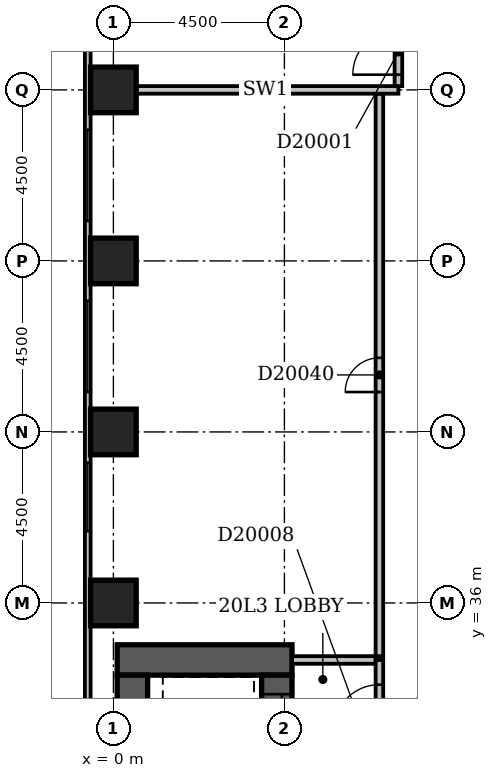
"""IFC4 building model, lengths in metres.
Left out: names, types, materials, properties, quantities, classifications, styles, units other than length and angle.
Written with IfcOpenShell. Run it as: python <this file> out.ifc"""

import sys

from ifc_helpers import new_model, si_unit, direction, frame, frame_2d, origin, origin_2d, place, context, subcontext, project, spatial, rectangle, extrude, element, fill, save


model = new_model("IFC4")
c1 = context("Model", 3, precision=1e-05, world=origin(), true_north=direction((0.0, 1.0)))
c2 = subcontext(c1, "Body", "Model", "MODEL_VIEW")
j1 = project(units=[si_unit("LENGTHUNIT", "METRE"), si_unit("PLANEANGLEUNIT", "RADIAN")], contexts=[c1])
p1 = place(None, origin())
s1 = spatial("IfcSite", under=j1, at=p1, CompositionType="ELEMENT")
p2 = place(p1, origin())
s2 = spatial("IfcBuilding", under=s1, at=p2, CompositionType="ELEMENT")
p3 = place(p2, frame((0.0, 0.0, 83.0)))
s3 = spatial("IfcBuildingStorey", under=s2, at=p3, CompositionType="ELEMENT", Elevation=83.0)
p4 = place(p3, frame((0.1, 34.5, -0.3), z_axis=(0.0, 0.0, 1.0), x_axis=(1.0, 0.0, 0.0)))
e1 = element("IfcWall", 1, at=p4, inside=s3, PredefinedType="SHEAR", context=c2, shape_type="SweptSolid", body=[
    extrude(rectangle(XDim=4.6, YDim=0.8, at=frame_2d((2.3, 0.0))), origin(), (0.0, 0.0, 1.0), 3.6),
])
p5 = place(p3, frame((0.5, 27.15, -0.3), z_axis=(0.0, 0.0, 1.0), x_axis=(0.0, 1.0, 0.0)))
e2 = element("IfcWall", 2, at=p5, inside=s3, PredefinedType="SHEAR", context=c2, shape_type="SweptSolid", body=[
    extrude(rectangle(XDim=6.95, YDim=0.8, at=frame_2d((3.475, 0.0))), origin(), (0.0, 0.0, 1.0), 3.6),
])
p6 = place(p3, frame((4.3, 27.15, -0.3), z_axis=(0.0, 0.0, 1.0), x_axis=(0.0, 1.0, 0.0)))
e3 = element("IfcWall", 3, at=p6, inside=s3, PredefinedType="SHEAR", context=c2, shape_type="SweptSolid", body=[
    extrude(rectangle(XDim=6.95, YDim=0.8, at=frame_2d((3.475, 0.0))), origin(), (0.0, 0.0, 1.0), 3.6),
])
p7 = place(p6, frame((3.05, 0.0, 0.3)))
e4 = element("IfcOpeningElement", 4, at=p7, cuts=e3, PredefinedType="OPENING", context=c2, shape_type="SweptSolid", body=[
    extrude(rectangle(XDim=1.1, YDim=2.1, at=frame_2d((0.55, 1.05))), frame((0.0, 0.412, 0.0), z_axis=(0.0, -1.0, 0.0), x_axis=(1.0, 0.0, 0.0)), (0.0, 0.0, 1.0), 0.824),
])
p8 = place(p6, frame((0.55, 0.0, 0.3)))
e5 = element("IfcOpeningElement", 5, at=p8, cuts=e3, PredefinedType="OPENING", context=c2, shape_type="SweptSolid", body=[
    extrude(rectangle(XDim=1.1, YDim=2.1, at=frame_2d((0.55, 1.05))), frame((0.0, 0.412, 0.0), z_axis=(0.0, -1.0, 0.0), x_axis=(1.0, 0.0, 0.0)), (0.0, 0.0, 1.0), 0.824),
])
p9 = place(p6, frame((5.35, 0.0, 0.3)))
e6 = element("IfcOpeningElement", 6, at=p9, cuts=e3, PredefinedType="OPENING", context=c2, shape_type="SweptSolid", body=[
    extrude(rectangle(XDim=1.1, YDim=2.1, at=frame_2d((0.55, 1.05))), frame((0.0, 0.412, 0.0), z_axis=(0.0, -1.0, 0.0), x_axis=(1.0, 0.0, 0.0)), (0.0, 0.0, 1.0), 0.824),
])
for number, where, z_axis, x_axis in (
    (7, (0.0, 36.0, -0.3), (0.0, 0.0, 1.0), (1.0, 0.0, 0.0)),
    (8, (0.0, 40.5, -0.3), (0.0, 0.0, 1.0), (1.0, 0.0, 0.0)),
    (9, (0.0, 45.0, -0.3), (0.0, 0.0, 1.0), (1.0, 0.0, 0.0)),
    (10, (0.0, 49.5, -0.3), (0.0, 0.0, 1.0), (1.0, 0.0, 0.0)),
):
    element("IfcColumn", number, at=place(p3, frame(where, z_axis=z_axis, x_axis=x_axis)), inside=s3, PredefinedType="COLUMN", context=c2, shape_type="SweptSolid", body=[
        extrude(rectangle(XDim=1.2, YDim=1.2, at=origin_2d()), origin(), (0.0, 0.0, 1.0), 3.6),
    ])
p10 = place(p3, frame((-0.675, 59.1, 0.0), z_axis=(0.0, 0.0, 1.0), x_axis=(0.0, -1.0, 0.0)))
e11 = element("IfcWall", 11, at=p10, inside=s3, PredefinedType="STANDARD", context=c2, shape_type="SweptSolid", body=[
    extrude(rectangle(XDim=55.35, YDim=0.15, at=frame_2d((27.675, 0.0))), origin(), (0.0, 0.0, 1.0), 2.7),
])
p11 = place(p10, frame((10.65, 0.0, 0.6)))
e12 = element("IfcOpeningElement", 12, at=p11, cuts=e11, PredefinedType="OPENING", context=c2, shape_type="SweptSolid", body=[
    extrude(rectangle(XDim=2.4, YDim=1.8, at=frame_2d((1.2, 0.9))), frame((0.0, 0.087, 0.0), z_axis=(0.0, -1.0, 0.0), x_axis=(1.0, 0.0, 0.0)), (0.0, 0.0, 1.0), 0.174),
])
p12 = place(p10, frame((15.15, 0.0, 0.6)))
e13 = element("IfcOpeningElement", 13, at=p12, cuts=e11, PredefinedType="OPENING", context=c2, shape_type="SweptSolid", body=[
    extrude(rectangle(XDim=2.4, YDim=1.8, at=frame_2d((1.2, 0.9))), frame((0.0, 0.087, 0.0), z_axis=(0.0, -1.0, 0.0), x_axis=(1.0, 0.0, 0.0)), (0.0, 0.0, 1.0), 0.174),
])
p13 = place(p10, frame((19.41, 0.0, 0.6)))
e14 = element("IfcOpeningElement", 14, at=p13, cuts=e11, PredefinedType="OPENING", context=c2, shape_type="SweptSolid", body=[
    extrude(rectangle(XDim=1.8, YDim=1.8, at=frame_2d((0.9, 0.9))), frame((0.0, 0.087, 0.0), z_axis=(0.0, -1.0, 0.0), x_axis=(1.0, 0.0, 0.0)), (0.0, 0.0, 1.0), 0.174),
])
p14 = place(p3, frame((7.0, 32.1, 0.0), z_axis=(0.0, 0.0, 1.0), x_axis=(0.0, 1.0, 0.0)))
e15 = element("IfcWall", 15, at=p14, inside=s3, PredefinedType="PARTITIONING", context=c2, shape_type="SweptSolid", body=[
    extrude(rectangle(XDim=2.4, YDim=0.2, at=frame_2d((1.2, 0.0))), origin(), (0.0, 0.0, 1.0), 3.3),
])
p15 = place(p14, frame((0.55, 0.0, 0.0)))
e16 = element("IfcOpeningElement", 16, at=p15, cuts=e15, PredefinedType="OPENING", context=c2, shape_type="SweptSolid", body=[
    extrude(rectangle(XDim=1.2, YDim=2.1, at=frame_2d((0.6, 1.05))), frame((0.0, 0.112, 0.0), z_axis=(0.0, -1.0, 0.0), x_axis=(1.0, 0.0, 0.0)), (0.0, 0.0, 1.0), 0.224),
])
p16 = place(p3, frame((4.7, 34.5, 0.0), z_axis=(0.0, 0.0, 1.0), x_axis=(1.0, 0.0, 0.0)))
e17 = element("IfcWall", 17, at=p16, inside=s3, PredefinedType="PARTITIONING", context=c2, shape_type="SweptSolid", body=[
    extrude(rectangle(XDim=2.2, YDim=0.2, at=frame_2d((1.1, 0.0))), origin(), (0.0, 0.0, 1.0), 3.3),
])
p17 = place(p3, frame((0.5, 49.5, 0.0), z_axis=(0.0, 0.0, 1.0), x_axis=(1.0, 0.0, 0.0)))
e18 = element("IfcWall", 18, at=p17, inside=s3, PredefinedType="PARTITIONING", context=c2, shape_type="SweptSolid", body=[
    extrude(rectangle(XDim=7.0, YDim=0.2, at=frame_2d((3.5, 0.0))), origin(), (0.0, 0.0, 1.0), 3.3),
])
p18 = place(p3, frame((7.5, 49.6, 0.0), z_axis=(0.0, 0.0, 1.0), x_axis=(0.0, 1.0, 0.0)))
e19 = element("IfcWall", 19, at=p18, inside=s3, PredefinedType="PARTITIONING", context=c2, shape_type="SweptSolid", body=[
    extrude(rectangle(XDim=3.9, YDim=0.2, at=frame_2d((1.95, 0.0))), origin(), (0.0, 0.0, 1.0), 3.3),
])
p19 = place(p18, frame((0.3, 0.0, 0.0)))
e20 = element("IfcOpeningElement", 20, at=p19, cuts=e19, PredefinedType="OPENING", context=c2, shape_type="SweptSolid", body=[
    extrude(rectangle(XDim=1.2, YDim=2.1, at=frame_2d((0.6, 1.05))), frame((0.0, 0.112, 0.0), z_axis=(0.0, -1.0, 0.0), x_axis=(1.0, 0.0, 0.0)), (0.0, 0.0, 1.0), 0.224),
])
p20 = place(p3, frame((7.0, 34.6, 0.0), z_axis=(0.0, 0.0, 1.0), x_axis=(0.0, 1.0, 0.0)))
e21 = element("IfcWall", 21, at=p20, inside=s3, PredefinedType="PARTITIONING", context=c2, shape_type="SweptSolid", body=[
    extrude(rectangle(XDim=14.8, YDim=0.2, at=frame_2d((7.4, 0.0))), origin(), (0.0, 0.0, 1.0), 3.3),
])
p21 = place(p20, frame((6.95, 0.0, 0.0)))
e22 = element("IfcOpeningElement", 22, at=p21, cuts=e21, PredefinedType="OPENING", context=c2, shape_type="SweptSolid", body=[
    extrude(rectangle(XDim=0.9, YDim=2.1, at=frame_2d((0.45, 1.05))), frame((0.0, 0.112, 0.0), z_axis=(0.0, -1.0, 0.0), x_axis=(1.0, 0.0, 0.0)), (0.0, 0.0, 1.0), 0.224),
])
p22 = place(p11, origin())
e23 = element("IfcWindow", 23, at=p22, inside=s3, PartitioningType="SINGLE_PANEL", PredefinedType="WINDOW", context=c2, shape_type="SweptSolid", body=[
    extrude(rectangle(XDim=2.4, YDim=1.8, at=frame_2d((1.2, 0.9))), frame((0.0, 0.03, 0.0), z_axis=(0.0, -1.0, 0.0), x_axis=(1.0, 0.0, 0.0)), (0.0, 0.0, 1.0), 0.06),
])
fill(e12, e23)
p23 = place(p12, origin())
e24 = element("IfcWindow", 24, at=p23, inside=s3, PartitioningType="SINGLE_PANEL", PredefinedType="WINDOW", context=c2, shape_type="SweptSolid", body=[
    extrude(rectangle(XDim=2.4, YDim=1.8, at=frame_2d((1.2, 0.9))), frame((0.0, 0.03, 0.0), z_axis=(0.0, -1.0, 0.0), x_axis=(1.0, 0.0, 0.0)), (0.0, 0.0, 1.0), 0.06),
])
fill(e13, e24)
p24 = place(p13, origin())
e25 = element("IfcWindow", 25, at=p24, inside=s3, PartitioningType="SINGLE_PANEL", PredefinedType="WINDOW", context=c2, shape_type="SweptSolid", body=[
    extrude(rectangle(XDim=1.8, YDim=1.8, at=frame_2d((0.9, 0.9))), frame((0.0, 0.03, 0.0), z_axis=(0.0, -1.0, 0.0), x_axis=(1.0, 0.0, 0.0)), (0.0, 0.0, 1.0), 0.06),
])
fill(e14, e25)
p25 = place(p19, origin())
e26 = element("IfcDoor", 26, at=p25, inside=s3, OperationType="SINGLE_SWING_LEFT", PredefinedType="DOOR", context=c2, shape_type="SweptSolid", body=[
    extrude(rectangle(XDim=1.2, YDim=2.1, at=frame_2d((0.6, 1.05))), frame((0.0, 0.025, 0.0), z_axis=(0.0, -1.0, 0.0), x_axis=(1.0, 0.0, 0.0)), (0.0, 0.0, 1.0), 0.05),
])
fill(e20, e26)
p26 = place(p15, origin())
e27 = element("IfcDoor", 27, at=p26, inside=s3, OperationType="SINGLE_SWING_LEFT", PredefinedType="DOOR", context=c2, shape_type="SweptSolid", body=[
    extrude(rectangle(XDim=1.2, YDim=2.1, at=frame_2d((0.6, 1.05))), frame((0.0, 0.025, 0.0), z_axis=(0.0, -1.0, 0.0), x_axis=(1.0, 0.0, 0.0)), (0.0, 0.0, 1.0), 0.05),
])
fill(e16, e27)
p27 = place(p9, origin())
e28 = element("IfcDoor", 28, at=p27, inside=s3, OperationType="SLIDING_TO_LEFT", PredefinedType="DOOR", context=c2, shape_type="SweptSolid", body=[
    extrude(rectangle(XDim=1.1, YDim=2.1, at=frame_2d((0.55, 1.05))), frame((0.0, 0.025, 0.0), z_axis=(0.0, -1.0, 0.0), x_axis=(1.0, 0.0, 0.0)), (0.0, 0.0, 1.0), 0.05),
])
fill(e6, e28)
p28 = place(p21, origin())
e29 = element("IfcDoor", 29, at=p28, inside=s3, OperationType="SINGLE_SWING_LEFT", PredefinedType="DOOR", context=c2, shape_type="SweptSolid", body=[
    extrude(rectangle(XDim=0.9, YDim=2.1, at=frame_2d((0.45, 1.05))), frame((0.0, 0.025, 0.0), z_axis=(0.0, -1.0, 0.0), x_axis=(1.0, 0.0, 0.0)), (0.0, 0.0, 1.0), 0.05),
])
fill(e22, e29)
save(model, sys.argv[1])
